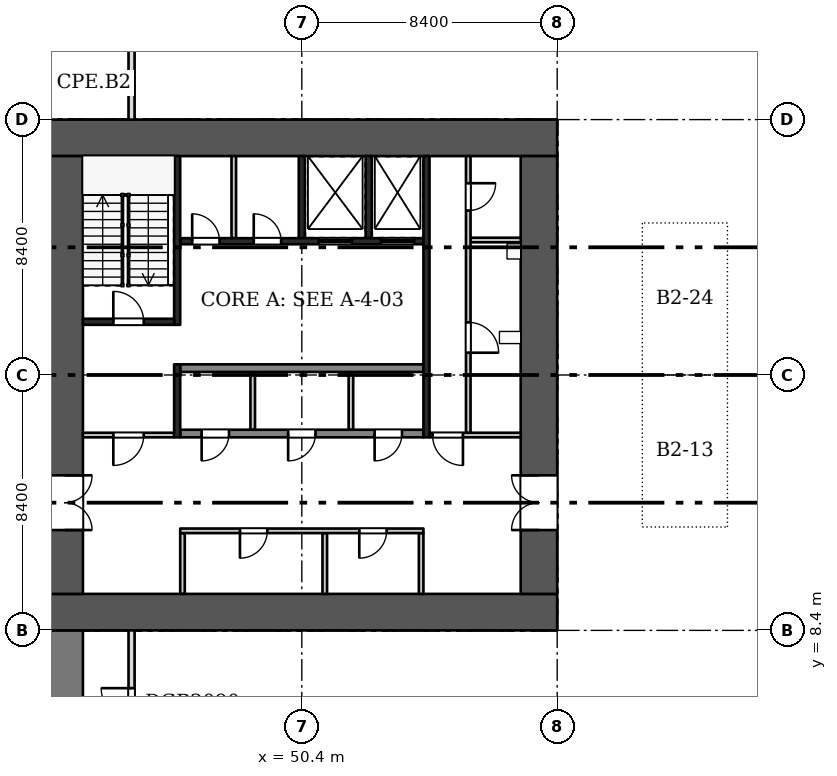
"""IFC4 building model, lengths in metres.
Left out: names, types, materials, properties, quantities, classifications, styles, units other than length and angle.
Written with IfcOpenShell. Run it as: python <this file> out.ifc"""

import sys

from ifc_helpers import new_model, si_unit, direction, frame, frame_2d, origin, place, context, subcontext, project, spatial, rectangle, extrude, element, fill, save


model = new_model("IFC4")
c1 = context("Model", 3, precision=1e-05, world=origin(), true_north=direction((0.0, 1.0)))
c2 = subcontext(c1, "Body", "Model", "MODEL_VIEW")
j1 = project(units=[si_unit("LENGTHUNIT", "METRE"), si_unit("PLANEANGLEUNIT", "RADIAN")], contexts=[c1])
p1 = place(None, origin())
s1 = spatial("IfcSite", under=j1, at=p1, CompositionType="ELEMENT")
p2 = place(p1, origin())
s2 = spatial("IfcBuilding", under=s1, at=p2, CompositionType="ELEMENT")
p3 = place(p2, frame((0.0, 0.0, -8.0)))
s3 = spatial("IfcBuildingStorey", under=s2, at=p3, CompositionType="ELEMENT", Elevation=-8.0)
p4 = place(p3, frame((42.6, 0.0, 0.0), z_axis=(0.0, 0.0, 1.0), x_axis=(0.0, 1.0, 0.0)))
e1 = element("IfcWall", 1, at=p4, inside=s3, PredefinedType="SHEAR", context=c2, shape_type="SweptSolid", body=[
    extrude(rectangle(XDim=8.4, YDim=1.2, at=frame_2d((4.2, 0.0))), origin(), (0.0, 0.0, 1.0), 3.7),
])
for number, where, z_axis, x_axis in (
    (2, (42.0, 9.0, 0.0), (0.0, 0.0, 1.0), (1.0, 0.0, 0.0)),
    (3, (42.0, 24.6, 0.0), (0.0, 0.0, 1.0), (1.0, 0.0, 0.0)),
):
    element("IfcWall", number, at=place(p3, frame(where, z_axis=z_axis, x_axis=x_axis)), inside=s3, PredefinedType="SHEAR", context=c2, shape_type="SweptSolid", body=[
        extrude(rectangle(XDim=16.8, YDim=1.2, at=frame_2d((8.4, 0.0))), origin(), (0.0, 0.0, 1.0), 3.7),
    ])
p5 = place(p3, frame((42.6, 9.6, 0.0), z_axis=(0.0, 0.0, 1.0), x_axis=(0.0, 1.0, 0.0)))
e4 = element("IfcWall", 4, at=p5, inside=s3, PredefinedType="SHEAR", context=c2, shape_type="SweptSolid", body=[
    extrude(rectangle(XDim=14.4, YDim=1.2, at=frame_2d((7.2, 0.0))), origin(), (0.0, 0.0, 1.0), 3.7),
])
p6 = place(p5, frame((2.1, 0.0, 0.0)))
e5 = element("IfcOpeningElement", 5, at=p6, cuts=e4, PredefinedType="OPENING", context=c2, shape_type="SweptSolid", body=[
    extrude(rectangle(XDim=1.8, YDim=2.1, at=frame_2d((0.9, 1.05))), frame((0.0, 0.61, 0.0), z_axis=(0.0, -1.0, 0.0), x_axis=(1.0, 0.0, 0.0)), (0.0, 0.0, 1.0), 1.22),
])
p7 = place(p3, frame((58.2, 9.6, 0.0), z_axis=(0.0, 0.0, 1.0), x_axis=(0.0, 1.0, 0.0)))
e6 = element("IfcWall", 6, at=p7, inside=s3, PredefinedType="SHEAR", context=c2, shape_type="SweptSolid", body=[
    extrude(rectangle(XDim=14.4, YDim=1.2, at=frame_2d((7.2, 0.0))), origin(), (0.0, 0.0, 1.0), 3.7),
])
p8 = place(p7, frame((2.1, 0.0, 0.0)))
e7 = element("IfcOpeningElement", 7, at=p8, cuts=e6, PredefinedType="OPENING", context=c2, shape_type="SweptSolid", body=[
    extrude(rectangle(XDim=1.8, YDim=2.1, at=frame_2d((0.9, 1.05))), frame((0.0, 0.61, 0.0), z_axis=(0.0, -1.0, 0.0), x_axis=(1.0, 0.0, 0.0)), (0.0, 0.0, 1.0), 1.22),
])
for number, where, z_axis, x_axis in (
    (8, (46.475, 9.6, 0.0), (0.0, 0.0, 1.0), (0.0, 1.0, 0.0)),
    (9, (54.325, 9.6, 0.0), (0.0, 0.0, 1.0), (0.0, 1.0, 0.0)),
    (10, (51.155, 9.6, 0.0), (0.0, 0.0, 1.0), (0.0, 1.0, 0.0)),
):
    element("IfcWall", number, at=place(p3, frame(where, z_axis=z_axis, x_axis=x_axis)), inside=s3, PredefinedType="PARTITIONING", context=c2, shape_type="SweptSolid", body=[
        extrude(rectangle(XDim=2.0, YDim=0.15, at=frame_2d((1.0, 0.0))), origin(), (0.0, 0.0, 1.0), 3.7),
    ])
p9 = place(p3, frame((46.4, 11.675, 0.0), z_axis=(0.0, 0.0, 1.0), x_axis=(1.0, 0.0, 0.0)))
e11 = element("IfcWall", 11, at=p9, inside=s3, PredefinedType="PARTITIONING", context=c2, shape_type="SweptSolid", body=[
    extrude(rectangle(XDim=8.0, YDim=0.15, at=frame_2d((4.0, 0.0))), origin(), (0.0, 0.0, 1.0), 3.7),
])
p10 = place(p9, frame((1.965, 0.0, 0.0)))
e12 = element("IfcOpeningElement", 12, at=p10, cuts=e11, PredefinedType="OPENING", context=c2, shape_type="SweptSolid", body=[
    extrude(rectangle(XDim=0.9, YDim=2.1, at=frame_2d((0.45, 1.05))), frame((0.0, 0.085, 0.0), z_axis=(0.0, -1.0, 0.0), x_axis=(1.0, 0.0, 0.0)), (0.0, 0.0, 1.0), 0.17),
])
p11 = place(p9, frame((5.89, 0.0, 0.0)))
e13 = element("IfcOpeningElement", 13, at=p11, cuts=e11, PredefinedType="OPENING", context=c2, shape_type="SweptSolid", body=[
    extrude(rectangle(XDim=0.9, YDim=2.1, at=frame_2d((0.45, 1.05))), frame((0.0, 0.085, 0.0), z_axis=(0.0, -1.0, 0.0), x_axis=(1.0, 0.0, 0.0)), (0.0, 0.0, 1.0), 0.17),
])
for number, where, z_axis, x_axis in (
    (14, (48.785, 15.0, 0.0), (0.0, 0.0, 1.0), (0.0, 1.0, 0.0)),
    (15, (52.015, 15.0, 0.0), (0.0, 0.0, 1.0), (0.0, 1.0, 0.0)),
):
    element("IfcWall", number, at=place(p3, frame(where, z_axis=z_axis, x_axis=x_axis)), inside=s3, PredefinedType="PARTITIONING", context=c2, shape_type="SweptSolid", body=[
        extrude(rectangle(XDim=1.9, YDim=0.15, at=frame_2d((0.95, 0.0))), origin(), (0.0, 0.0, 1.0), 3.7),
    ])
p12 = place(p3, frame((46.4, 14.875, 0.0), z_axis=(0.0, 0.0, 1.0), x_axis=(1.0, 0.0, 0.0)))
e16 = element("IfcWall", 16, at=p12, inside=s3, PredefinedType="SHEAR", context=c2, shape_type="SweptSolid", body=[
    extrude(rectangle(XDim=8.0, YDim=0.25, at=frame_2d((4.0, 0.0))), origin(), (0.0, 0.0, 1.0), 3.7),
])
p13 = place(p12, frame((0.705, 0.0, 0.0)))
e17 = element("IfcOpeningElement", 17, at=p13, cuts=e16, PredefinedType="OPENING", context=c2, shape_type="SweptSolid", body=[
    extrude(rectangle(XDim=0.9, YDim=2.1, at=frame_2d((0.45, 1.05))), frame((0.0, 0.135, 0.0), z_axis=(0.0, -1.0, 0.0), x_axis=(1.0, 0.0, 0.0)), (0.0, 0.0, 1.0), 0.27),
])
p14 = place(p12, frame((3.55, 0.0, 0.0)))
e18 = element("IfcOpeningElement", 18, at=p14, cuts=e16, PredefinedType="OPENING", context=c2, shape_type="SweptSolid", body=[
    extrude(rectangle(XDim=0.9, YDim=2.1, at=frame_2d((0.45, 1.05))), frame((0.0, 0.135, 0.0), z_axis=(0.0, -1.0, 0.0), x_axis=(1.0, 0.0, 0.0)), (0.0, 0.0, 1.0), 0.27),
])
p15 = place(p12, frame((6.395, 0.0, 0.0)))
e19 = element("IfcOpeningElement", 19, at=p15, cuts=e16, PredefinedType="OPENING", context=c2, shape_type="SweptSolid", body=[
    extrude(rectangle(XDim=0.9, YDim=2.1, at=frame_2d((0.45, 1.05))), frame((0.0, 0.135, 0.0), z_axis=(0.0, -1.0, 0.0), x_axis=(1.0, 0.0, 0.0)), (0.0, 0.0, 1.0), 0.27),
])
p16 = place(p3, frame((46.4, 17.025, 0.0), z_axis=(0.0, 0.0, 1.0), x_axis=(1.0, 0.0, 0.0)))
e20 = element("IfcWall", 20, at=p16, inside=s3, PredefinedType="SHEAR", context=c2, shape_type="SweptSolid", body=[
    extrude(rectangle(XDim=8.0, YDim=0.25, at=frame_2d((4.0, 0.0))), origin(), (0.0, 0.0, 1.0), 3.7),
])
for number, where, z_axis, x_axis in (
    (21, (50.4, 21.3, 0.0), (0.0, 0.0, 1.0), (0.0, 1.0, 0.0)),
    (22, (52.6, 21.3, 0.0), (0.0, 0.0, 1.0), (0.0, 1.0, 0.0)),
):
    element("IfcWall", number, at=place(p3, frame(where, z_axis=z_axis, x_axis=x_axis)), inside=s3, PredefinedType="SHEAR", context=c2, shape_type="SweptSolid", body=[
        extrude(rectangle(XDim=2.7, YDim=0.2, at=frame_2d((1.35, 0.0))), origin(), (0.0, 0.0, 1.0), 3.7),
    ])
p17 = place(p3, frame((48.163, 21.3, 0.0), z_axis=(0.0, 0.0, 1.0), x_axis=(0.0, 1.0, 0.0)))
e23 = element("IfcWall", 23, at=p17, inside=s3, PredefinedType="PARTITIONING", context=c2, shape_type="SweptSolid", body=[
    extrude(rectangle(XDim=2.7, YDim=0.15, at=frame_2d((1.35, 0.0))), origin(), (0.0, 0.0, 1.0), 3.7),
])
p18 = place(p3, frame((46.4, 21.2, 0.0), z_axis=(0.0, 0.0, 1.0), x_axis=(1.0, 0.0, 0.0)))
e24 = element("IfcWall", 24, at=p18, inside=s3, PredefinedType="SHEAR", context=c2, shape_type="SweptSolid", body=[
    extrude(rectangle(XDim=8.0, YDim=0.2, at=frame_2d((4.0, 0.0))), origin(), (0.0, 0.0, 1.0), 3.7),
])
p19 = place(p18, frame((0.394, 0.0, 0.0)))
e25 = element("IfcOpeningElement", 25, at=p19, cuts=e24, PredefinedType="OPENING", context=c2, shape_type="SweptSolid", body=[
    extrude(rectangle(XDim=0.9, YDim=2.1, at=frame_2d((0.45, 1.05))), frame((0.0, 0.11, 0.0), z_axis=(0.0, -1.0, 0.0), x_axis=(1.0, 0.0, 0.0)), (0.0, 0.0, 1.0), 0.22),
])
p20 = place(p18, frame((2.419, 0.0, 0.0)))
e26 = element("IfcOpeningElement", 26, at=p20, cuts=e24, PredefinedType="OPENING", context=c2, shape_type="SweptSolid", body=[
    extrude(rectangle(XDim=0.9, YDim=2.1, at=frame_2d((0.45, 1.05))), frame((0.0, 0.11, 0.0), z_axis=(0.0, -1.0, 0.0), x_axis=(1.0, 0.0, 0.0)), (0.0, 0.0, 1.0), 0.22),
])
p21 = place(p18, frame((4.55, 0.0, 0.0)))
e27 = element("IfcOpeningElement", 27, at=p21, cuts=e24, PredefinedType="OPENING", context=c2, shape_type="SweptSolid", body=[
    extrude(rectangle(XDim=1.1, YDim=2.1, at=frame_2d((0.55, 1.05))), frame((0.0, 0.11, 0.0), z_axis=(0.0, -1.0, 0.0), x_axis=(1.0, 0.0, 0.0)), (0.0, 0.0, 1.0), 0.22),
])
p22 = place(p18, frame((6.6, 0.0, 0.0)))
e28 = element("IfcOpeningElement", 28, at=p22, cuts=e24, PredefinedType="OPENING", context=c2, shape_type="SweptSolid", body=[
    extrude(rectangle(XDim=1.1, YDim=2.1, at=frame_2d((0.55, 1.05))), frame((0.0, 0.11, 0.0), z_axis=(0.0, -1.0, 0.0), x_axis=(1.0, 0.0, 0.0)), (0.0, 0.0, 1.0), 0.22),
])
p23 = place(p3, frame((46.3, 14.75, 0.0), z_axis=(0.0, 0.0, 1.0), x_axis=(0.0, 1.0, 0.0)))
e29 = element("IfcWall", 29, at=p23, inside=s3, PredefinedType="SHEAR", context=c2, shape_type="SweptSolid", body=[
    extrude(rectangle(XDim=2.4, YDim=0.2, at=frame_2d((1.2, 0.0))), origin(), (0.0, 0.0, 1.0), 3.7),
])
p24 = place(p3, frame((46.3, 18.45, 0.0), z_axis=(0.0, 0.0, 1.0), x_axis=(0.0, 1.0, 0.0)))
e30 = element("IfcWall", 30, at=p24, inside=s3, PredefinedType="SHEAR", context=c2, shape_type="SweptSolid", body=[
    extrude(rectangle(XDim=5.55, YDim=0.2, at=frame_2d((2.775, 0.0))), origin(), (0.0, 0.0, 1.0), 3.7),
])
p25 = place(p3, frame((43.2, 14.825, 0.0), z_axis=(0.0, 0.0, 1.0), x_axis=(1.0, 0.0, 0.0)))
e31 = element("IfcWall", 31, at=p25, inside=s3, PredefinedType="PARTITIONING", context=c2, shape_type="SweptSolid", body=[
    extrude(rectangle(XDim=3.0, YDim=0.15, at=frame_2d((1.5, 0.0))), origin(), (0.0, 0.0, 1.0), 3.7),
])
p26 = place(p25, frame((1.0, 0.0, 0.0)))
e32 = element("IfcOpeningElement", 32, at=p26, cuts=e31, PredefinedType="OPENING", context=c2, shape_type="SweptSolid", body=[
    extrude(rectangle(XDim=1.0, YDim=2.1, at=frame_2d((0.5, 1.05))), frame((0.0, 0.085, 0.0), z_axis=(0.0, -1.0, 0.0), x_axis=(1.0, 0.0, 0.0)), (0.0, 0.0, 1.0), 0.17),
])
p27 = place(p3, frame((43.2, 18.55, 0.0), z_axis=(0.0, 0.0, 1.0), x_axis=(1.0, 0.0, 0.0)))
e33 = element("IfcWall", 33, at=p27, inside=s3, PredefinedType="SHEAR", context=c2, shape_type="SweptSolid", body=[
    extrude(rectangle(XDim=3.0, YDim=0.2, at=frame_2d((1.5, 0.0))), origin(), (0.0, 0.0, 1.0), 3.7),
])
p28 = place(p27, frame((1.0, 0.0, 0.0)))
e34 = element("IfcOpeningElement", 34, at=p28, cuts=e33, PredefinedType="OPENING", context=c2, shape_type="SweptSolid", body=[
    extrude(rectangle(XDim=1.0, YDim=2.1, at=frame_2d((0.5, 1.05))), frame((0.0, 0.11, 0.0), z_axis=(0.0, -1.0, 0.0), x_axis=(1.0, 0.0, 0.0)), (0.0, 0.0, 1.0), 0.22),
])
p29 = place(p3, frame((54.5, 14.75, 0.0), z_axis=(0.0, 0.0, 1.0), x_axis=(0.0, 1.0, 0.0)))
e35 = element("IfcWall", 35, at=p29, inside=s3, PredefinedType="SHEAR", context=c2, shape_type="SweptSolid", body=[
    extrude(rectangle(XDim=9.25, YDim=0.2, at=frame_2d((4.625, 0.0))), origin(), (0.0, 0.0, 1.0), 3.7),
])
p30 = place(p3, frame((54.6, 14.825, 0.0), z_axis=(0.0, 0.0, 1.0), x_axis=(1.0, 0.0, 0.0)))
e36 = element("IfcWall", 36, at=p30, inside=s3, PredefinedType="PARTITIONING", context=c2, shape_type="SweptSolid", body=[
    extrude(rectangle(XDim=3.0, YDim=0.15, at=frame_2d((1.5, 0.0))), origin(), (0.0, 0.0, 1.0), 3.7),
])
p31 = place(p30, frame((0.1, 0.0, 0.0)))
e37 = element("IfcOpeningElement", 37, at=p31, cuts=e36, PredefinedType="OPENING", context=c2, shape_type="SweptSolid", body=[
    extrude(rectangle(XDim=1.0, YDim=2.1, at=frame_2d((0.5, 1.05))), frame((0.0, 0.085, 0.0), z_axis=(0.0, -1.0, 0.0), x_axis=(1.0, 0.0, 0.0)), (0.0, 0.0, 1.0), 0.17),
])
p32 = place(p3, frame((55.95, 21.24, 0.0), z_axis=(0.0, 0.0, 1.0), x_axis=(1.0, 0.0, 0.0)))
e38 = element("IfcWall", 38, at=p32, inside=s3, PredefinedType="PARTITIONING", context=c2, shape_type="SweptSolid", body=[
    extrude(rectangle(XDim=1.65, YDim=0.15, at=frame_2d((0.825, 0.0))), origin(), (0.0, 0.0, 1.0), 3.7),
])
p33 = place(p3, frame((55.875, 14.9, 0.0), z_axis=(0.0, 0.0, 1.0), x_axis=(0.0, 1.0, 0.0)))
e39 = element("IfcWall", 39, at=p33, inside=s3, PredefinedType="PARTITIONING", context=c2, shape_type="SweptSolid", body=[
    extrude(rectangle(XDim=9.1, YDim=0.15, at=frame_2d((4.55, 0.0))), origin(), (0.0, 0.0, 1.0), 3.7),
])
p34 = place(p33, frame((2.633, 0.0, 0.0)))
e40 = element("IfcOpeningElement", 40, at=p34, cuts=e39, PredefinedType="OPENING", context=c2, shape_type="SweptSolid", body=[
    extrude(rectangle(XDim=1.0, YDim=2.1, at=frame_2d((0.5, 1.05))), frame((0.0, 0.085, 0.0), z_axis=(0.0, -1.0, 0.0), x_axis=(1.0, 0.0, 0.0)), (0.0, 0.0, 1.0), 0.17),
])
p35 = place(p33, frame((7.308, 0.0, 0.0)))
e41 = element("IfcOpeningElement", 41, at=p35, cuts=e39, PredefinedType="OPENING", context=c2, shape_type="SweptSolid", body=[
    extrude(rectangle(XDim=0.9, YDim=2.1, at=frame_2d((0.45, 1.05))), frame((0.0, 0.085, 0.0), z_axis=(0.0, -1.0, 0.0), x_axis=(1.0, 0.0, 0.0)), (0.0, 0.0, 1.0), 0.17),
])
p36 = place(p3, frame((44.8, 5.0, 0.0), z_axis=(0.0, 0.0, 1.0), x_axis=(0.0, 1.0, 0.0)))
e42 = element("IfcWall", 42, at=p36, inside=s3, PredefinedType="PARTITIONING", context=c2, shape_type="SweptSolid", body=[
    extrude(rectangle(XDim=3.4, YDim=0.2, at=frame_2d((1.7, 0.0))), origin(), (0.0, 0.0, 1.0), 3.7),
])
p37 = place(p36, frame((0.5, 0.0, 0.0)))
e43 = element("IfcOpeningElement", 43, at=p37, cuts=e42, PredefinedType="OPENING", context=c2, shape_type="SweptSolid", body=[
    extrude(rectangle(XDim=1.0, YDim=2.1, at=frame_2d((0.5, 1.05))), frame((0.0, 0.11, 0.0), z_axis=(0.0, -1.0, 0.0), x_axis=(1.0, 0.0, 0.0)), (0.0, 0.0, 1.0), 0.22),
])
p38 = place(p3, frame((44.8, 25.2, 0.0), z_axis=(0.0, 0.0, 1.0), x_axis=(0.0, 1.0, 0.0)))
e44 = element("IfcWall", 44, at=p38, inside=s3, PredefinedType="PARTITIONING", context=c2, shape_type="SweptSolid", body=[
    extrude(rectangle(XDim=3.4, YDim=0.2, at=frame_2d((1.7, 0.0))), origin(), (0.0, 0.0, 1.0), 3.7),
])
p39 = place(p6, frame((1.8, 0.0, 0.0), z_axis=(0.0, 0.0, 1.0), x_axis=(-1.0, 0.0, 0.0)))
e45 = element("IfcDoor", 45, at=p39, inside=s3, OperationType="DOUBLE_DOOR_SINGLE_SWING", PredefinedType="DOOR", context=c2, shape_type="SweptSolid", body=[
    extrude(rectangle(XDim=1.8, YDim=2.1, at=frame_2d((0.9, 1.05))), frame((0.0, 0.025, 0.0), z_axis=(0.0, -1.0, 0.0), x_axis=(1.0, 0.0, 0.0)), (0.0, 0.0, 1.0), 0.05),
])
fill(e5, e45)
p40 = place(p8, origin())
e46 = element("IfcDoor", 46, at=p40, inside=s3, OperationType="DOUBLE_DOOR_SINGLE_SWING", PredefinedType="DOOR", context=c2, shape_type="SweptSolid", body=[
    extrude(rectangle(XDim=1.8, YDim=2.1, at=frame_2d((0.9, 1.05))), frame((0.0, 0.025, 0.0), z_axis=(0.0, -1.0, 0.0), x_axis=(1.0, 0.0, 0.0)), (0.0, 0.0, 1.0), 0.05),
])
fill(e7, e46)
p41 = place(p10, frame((0.9, 0.0, 0.0), z_axis=(0.0, 0.0, 1.0), x_axis=(-1.0, 0.0, 0.0)))
e47 = element("IfcDoor", 47, at=p41, inside=s3, OperationType="SINGLE_SWING_RIGHT", PredefinedType="DOOR", context=c2, shape_type="SweptSolid", body=[
    extrude(rectangle(XDim=0.9, YDim=2.1, at=frame_2d((0.45, 1.05))), frame((0.0, 0.025, 0.0), z_axis=(0.0, -1.0, 0.0), x_axis=(1.0, 0.0, 0.0)), (0.0, 0.0, 1.0), 0.05),
])
fill(e12, e47)
p42 = place(p11, frame((0.9, 0.0, 0.0), z_axis=(0.0, 0.0, 1.0), x_axis=(-1.0, 0.0, 0.0)))
e48 = element("IfcDoor", 48, at=p42, inside=s3, OperationType="SINGLE_SWING_RIGHT", PredefinedType="DOOR", context=c2, shape_type="SweptSolid", body=[
    extrude(rectangle(XDim=0.9, YDim=2.1, at=frame_2d((0.45, 1.05))), frame((0.0, 0.025, 0.0), z_axis=(0.0, -1.0, 0.0), x_axis=(1.0, 0.0, 0.0)), (0.0, 0.0, 1.0), 0.05),
])
fill(e13, e48)
p43 = place(p13, frame((0.9, 0.0, 0.0), z_axis=(0.0, 0.0, 1.0), x_axis=(-1.0, 0.0, 0.0)))
e49 = element("IfcDoor", 49, at=p43, inside=s3, OperationType="SINGLE_SWING_RIGHT", PredefinedType="DOOR", context=c2, shape_type="SweptSolid", body=[
    extrude(rectangle(XDim=0.9, YDim=2.1, at=frame_2d((0.45, 1.05))), frame((0.0, 0.025, 0.0), z_axis=(0.0, -1.0, 0.0), x_axis=(1.0, 0.0, 0.0)), (0.0, 0.0, 1.0), 0.05),
])
fill(e17, e49)
p44 = place(p14, frame((0.9, 0.0, 0.0), z_axis=(0.0, 0.0, 1.0), x_axis=(-1.0, 0.0, 0.0)))
e50 = element("IfcDoor", 50, at=p44, inside=s3, OperationType="SINGLE_SWING_RIGHT", PredefinedType="DOOR", context=c2, shape_type="SweptSolid", body=[
    extrude(rectangle(XDim=0.9, YDim=2.1, at=frame_2d((0.45, 1.05))), frame((0.0, 0.025, 0.0), z_axis=(0.0, -1.0, 0.0), x_axis=(1.0, 0.0, 0.0)), (0.0, 0.0, 1.0), 0.05),
])
fill(e18, e50)
p45 = place(p15, frame((0.9, 0.0, 0.0), z_axis=(0.0, 0.0, 1.0), x_axis=(-1.0, 0.0, 0.0)))
e51 = element("IfcDoor", 51, at=p45, inside=s3, OperationType="SINGLE_SWING_RIGHT", PredefinedType="DOOR", context=c2, shape_type="SweptSolid", body=[
    extrude(rectangle(XDim=0.9, YDim=2.1, at=frame_2d((0.45, 1.05))), frame((0.0, 0.025, 0.0), z_axis=(0.0, -1.0, 0.0), x_axis=(1.0, 0.0, 0.0)), (0.0, 0.0, 1.0), 0.05),
])
fill(e19, e51)
p46 = place(p19, origin())
e52 = element("IfcDoor", 52, at=p46, inside=s3, OperationType="SINGLE_SWING_LEFT", PredefinedType="DOOR", context=c2, shape_type="SweptSolid", body=[
    extrude(rectangle(XDim=0.9, YDim=2.1, at=frame_2d((0.45, 1.05))), frame((0.0, 0.025, 0.0), z_axis=(0.0, -1.0, 0.0), x_axis=(1.0, 0.0, 0.0)), (0.0, 0.0, 1.0), 0.05),
])
fill(e25, e52)
p47 = place(p20, origin())
e53 = element("IfcDoor", 53, at=p47, inside=s3, OperationType="SINGLE_SWING_LEFT", PredefinedType="DOOR", context=c2, shape_type="SweptSolid", body=[
    extrude(rectangle(XDim=0.9, YDim=2.1, at=frame_2d((0.45, 1.05))), frame((0.0, 0.025, 0.0), z_axis=(0.0, -1.0, 0.0), x_axis=(1.0, 0.0, 0.0)), (0.0, 0.0, 1.0), 0.05),
])
fill(e26, e53)
p48 = place(p21, origin())
e54 = element("IfcDoor", 54, at=p48, inside=s3, OperationType="DOUBLE_DOOR_SLIDING", PredefinedType="DOOR", context=c2, shape_type="SweptSolid", body=[
    extrude(rectangle(XDim=1.1, YDim=2.1, at=frame_2d((0.55, 1.05))), frame((0.0, 0.025, 0.0), z_axis=(0.0, -1.0, 0.0), x_axis=(1.0, 0.0, 0.0)), (0.0, 0.0, 1.0), 0.05),
])
fill(e27, e54)
p49 = place(p22, origin())
e55 = element("IfcDoor", 55, at=p49, inside=s3, OperationType="DOUBLE_DOOR_SLIDING", PredefinedType="DOOR", context=c2, shape_type="SweptSolid", body=[
    extrude(rectangle(XDim=1.1, YDim=2.1, at=frame_2d((0.55, 1.05))), frame((0.0, 0.025, 0.0), z_axis=(0.0, -1.0, 0.0), x_axis=(1.0, 0.0, 0.0)), (0.0, 0.0, 1.0), 0.05),
])
fill(e28, e55)
p50 = place(p26, frame((1.0, 0.0, 0.0), z_axis=(0.0, 0.0, 1.0), x_axis=(-1.0, 0.0, 0.0)))
e56 = element("IfcDoor", 56, at=p50, inside=s3, OperationType="SINGLE_SWING_RIGHT", PredefinedType="DOOR", context=c2, shape_type="SweptSolid", body=[
    extrude(rectangle(XDim=1.0, YDim=2.1, at=frame_2d((0.5, 1.05))), frame((0.0, 0.025, 0.0), z_axis=(0.0, -1.0, 0.0), x_axis=(1.0, 0.0, 0.0)), (0.0, 0.0, 1.0), 0.05),
])
fill(e32, e56)
p51 = place(p28, origin())
e57 = element("IfcDoor", 57, at=p51, inside=s3, OperationType="SINGLE_SWING_LEFT", PredefinedType="DOOR", context=c2, shape_type="SweptSolid", body=[
    extrude(rectangle(XDim=1.0, YDim=2.1, at=frame_2d((0.5, 1.05))), frame((0.0, 0.025, 0.0), z_axis=(0.0, -1.0, 0.0), x_axis=(1.0, 0.0, 0.0)), (0.0, 0.0, 1.0), 0.05),
])
fill(e34, e57)
p52 = place(p31, frame((1.0, 0.0, 0.0), z_axis=(0.0, 0.0, 1.0), x_axis=(-1.0, 0.0, 0.0)))
e58 = element("IfcDoor", 58, at=p52, inside=s3, OperationType="SINGLE_SWING_LEFT", PredefinedType="DOOR", context=c2, shape_type="SweptSolid", body=[
    extrude(rectangle(XDim=1.0, YDim=2.1, at=frame_2d((0.5, 1.05))), frame((0.0, 0.025, 0.0), z_axis=(0.0, -1.0, 0.0), x_axis=(1.0, 0.0, 0.0)), (0.0, 0.0, 1.0), 0.05),
])
fill(e37, e58)
p53 = place(p34, frame((1.0, 0.0, 0.0), z_axis=(0.0, 0.0, 1.0), x_axis=(-1.0, 0.0, 0.0)))
e59 = element("IfcDoor", 59, at=p53, inside=s3, OperationType="SINGLE_SWING_RIGHT", PredefinedType="DOOR", context=c2, shape_type="SweptSolid", body=[
    extrude(rectangle(XDim=1.0, YDim=2.1, at=frame_2d((0.5, 1.05))), frame((0.0, 0.025, 0.0), z_axis=(0.0, -1.0, 0.0), x_axis=(1.0, 0.0, 0.0)), (0.0, 0.0, 1.0), 0.05),
])
fill(e40, e59)
p54 = place(p35, frame((0.9, 0.0, 0.0), z_axis=(0.0, 0.0, 1.0), x_axis=(-1.0, 0.0, 0.0)))
e60 = element("IfcDoor", 60, at=p54, inside=s3, OperationType="SINGLE_SWING_LEFT", PredefinedType="DOOR", context=c2, shape_type="SweptSolid", body=[
    extrude(rectangle(XDim=0.9, YDim=2.1, at=frame_2d((0.45, 1.05))), frame((0.0, 0.025, 0.0), z_axis=(0.0, -1.0, 0.0), x_axis=(1.0, 0.0, 0.0)), (0.0, 0.0, 1.0), 0.05),
])
fill(e41, e60)
p55 = place(p37, origin())
e61 = element("IfcDoor", 61, at=p55, inside=s3, OperationType="SINGLE_SWING_RIGHT", PredefinedType="DOOR", context=c2, shape_type="SweptSolid", body=[
    extrude(rectangle(XDim=1.0, YDim=2.1, at=frame_2d((0.5, 1.05))), frame((0.0, 0.025, 0.0), z_axis=(0.0, -1.0, 0.0), x_axis=(1.0, 0.0, 0.0)), (0.0, 0.0, 1.0), 0.05),
])
fill(e43, e61)
save(model, sys.argv[1])
